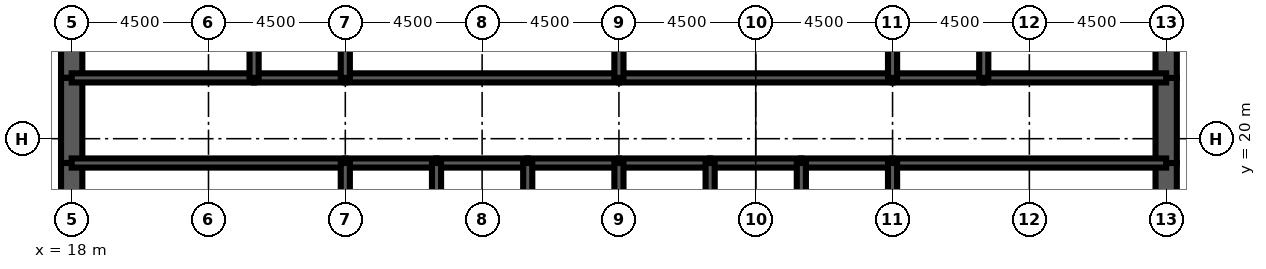
"""IFC4 building model, lengths in metres.
Left out: names, types, materials, properties, quantities, classifications, styles, units other than length and angle.
Written with IfcOpenShell. Run it as: python <this file> out.ifc"""

import sys

from ifc_helpers import new_model, si_unit, direction, frame, frame_2d, origin, place, context, subcontext, project, spatial, rectangle, extrude, element, fill, save


model = new_model("IFC4")
c1 = context("Model", 3, precision=1e-05, world=origin(), true_north=direction((0.0, 1.0)))
c2 = subcontext(c1, "Body", "Model", "MODEL_VIEW")
j1 = project(units=[si_unit("LENGTHUNIT", "METRE"), si_unit("PLANEANGLEUNIT", "RADIAN")], contexts=[c1])
p1 = place(None, origin())
s1 = spatial("IfcSite", under=j1, at=p1, CompositionType="ELEMENT")
p2 = place(p1, origin())
s2 = spatial("IfcBuilding", under=s1, at=p2, CompositionType="ELEMENT")
p3 = place(p2, frame((0.0, 0.0, 296.3)))
s3 = spatial("IfcBuildingStorey", under=s2, at=p3, CompositionType="ELEMENT", Elevation=296.3)
p4 = place(p3, frame((18.0, 26.0, 0.0), z_axis=(0.0, 0.0, 1.0), x_axis=(0.0, -1.0, 0.0)))
e1 = element("IfcWall", 1, at=p4, inside=s3, PredefinedType="SHEAR", context=c2, shape_type="SweptSolid", body=[
    extrude(rectangle(XDim=4.0, YDim=0.7, at=frame_2d((2.0, 0.0))), origin(), (0.0, 0.0, 1.0), 4.2),
])
p5 = place(p3, frame((18.0, 22.0, 0.0), z_axis=(0.0, 0.0, 1.0), x_axis=(0.0, -1.0, 0.0)))
e2 = element("IfcWall", 2, at=p5, inside=s3, PredefinedType="SHEAR", context=c2, shape_type="SweptSolid", body=[
    extrude(rectangle(XDim=2.8, YDim=0.7, at=frame_2d((1.4, 0.0))), origin(), (0.0, 0.0, 1.0), 4.2),
])
p6 = place(p5, frame((0.6, 0.0, 0.0)))
e3 = element("IfcOpeningElement", 3, at=p6, cuts=e2, PredefinedType="OPENING", context=c2, shape_type="SweptSolid", body=[
    extrude(rectangle(XDim=1.8, YDim=2.1, at=frame_2d((0.9, 1.05))), frame((0.0, 0.36, 0.0), z_axis=(0.0, -1.0, 0.0), x_axis=(1.0, 0.0, 0.0)), (0.0, 0.0, 1.0), 0.72),
])
for number, where, z_axis, x_axis in (
    (4, (18.0, 19.2, 0.0), (0.0, 0.0, 1.0), (0.0, -1.0, 0.0)),
    (5, (54.0, 16.0, 0.0), (0.0, 0.0, 1.0), (0.0, 1.0, 0.0)),
):
    element("IfcWall", number, at=place(p3, frame(where, z_axis=z_axis, x_axis=x_axis)), inside=s3, PredefinedType="SHEAR", context=c2, shape_type="SweptSolid", body=[
        extrude(rectangle(XDim=3.2, YDim=0.7, at=frame_2d((1.6, 0.0))), origin(), (0.0, 0.0, 1.0), 4.2),
    ])
p7 = place(p3, frame((54.0, 19.2, 0.0), z_axis=(0.0, 0.0, 1.0), x_axis=(0.0, 1.0, 0.0)))
e6 = element("IfcWall", 6, at=p7, inside=s3, PredefinedType="SHEAR", context=c2, shape_type="SweptSolid", body=[
    extrude(rectangle(XDim=2.8, YDim=0.7, at=frame_2d((1.4, 0.0))), origin(), (0.0, 0.0, 1.0), 4.2),
])
p8 = place(p7, frame((0.4, 0.0, 0.0)))
e7 = element("IfcOpeningElement", 7, at=p8, cuts=e6, PredefinedType="OPENING", context=c2, shape_type="SweptSolid", body=[
    extrude(rectangle(XDim=1.8, YDim=2.1, at=frame_2d((0.9, 1.05))), frame((0.0, 0.36, 0.0), z_axis=(0.0, -1.0, 0.0), x_axis=(1.0, 0.0, 0.0)), (0.0, 0.0, 1.0), 0.72),
])
p9 = place(p3, frame((54.0, 22.0, 0.0), z_axis=(0.0, 0.0, 1.0), x_axis=(0.0, 1.0, 0.0)))
e8 = element("IfcWall", 8, at=p9, inside=s3, PredefinedType="SHEAR", context=c2, shape_type="SweptSolid", body=[
    extrude(rectangle(XDim=4.0, YDim=0.7, at=frame_2d((2.0, 0.0))), origin(), (0.0, 0.0, 1.0), 4.2),
])
p10 = place(p3, frame((18.0, 19.2, 0.0), z_axis=(0.0, 0.0, 1.0), x_axis=(1.0, 0.0, 0.0)))
e9 = element("IfcWall", 9, at=p10, inside=s3, PredefinedType="SOLIDWALL", context=c2, shape_type="SweptSolid", body=[
    extrude(rectangle(XDim=9.0, YDim=0.3, at=frame_2d((4.5, 0.0))), origin(), (0.0, 0.0, 1.0), 4.2),
])
p11 = place(p10, frame((0.65, 0.0, 0.0)))
e10 = element("IfcOpeningElement", 10, at=p11, cuts=e9, PredefinedType="OPENING", context=c2, shape_type="SweptSolid", body=[
    extrude(rectangle(XDim=1.0, YDim=2.1, at=frame_2d((0.5, 1.05))), frame((0.0, 0.16, 0.0), z_axis=(0.0, -1.0, 0.0), x_axis=(1.0, 0.0, 0.0)), (0.0, 0.0, 1.0), 0.32),
])
p12 = place(p3, frame((27.0, 19.2, 0.0), z_axis=(0.0, 0.0, 1.0), x_axis=(1.0, 0.0, 0.0)))
e11 = element("IfcWall", 11, at=p12, inside=s3, PredefinedType="SOLIDWALL", context=c2, shape_type="SweptSolid", body=[
    extrude(rectangle(XDim=3.0, YDim=0.3, at=frame_2d((1.5, 0.0))), origin(), (0.0, 0.0, 1.0), 4.2),
])
p13 = place(p12, frame((0.95, 0.0, 0.0)))
e12 = element("IfcOpeningElement", 12, at=p13, cuts=e11, PredefinedType="OPENING", context=c2, shape_type="SweptSolid", body=[
    extrude(rectangle(XDim=1.1, YDim=2.2, at=frame_2d((0.55, 1.1))), frame((0.0, 0.16, 0.0), z_axis=(0.0, -1.0, 0.0), x_axis=(1.0, 0.0, 0.0)), (0.0, 0.0, 1.0), 0.32),
])
p14 = place(p3, frame((30.0, 19.2, 0.0), z_axis=(0.0, 0.0, 1.0), x_axis=(1.0, 0.0, 0.0)))
e13 = element("IfcWall", 13, at=p14, inside=s3, PredefinedType="SOLIDWALL", context=c2, shape_type="SweptSolid", body=[
    extrude(rectangle(XDim=3.0, YDim=0.3, at=frame_2d((1.5, 0.0))), origin(), (0.0, 0.0, 1.0), 4.2),
])
p15 = place(p14, frame((0.95, 0.0, 0.0)))
e14 = element("IfcOpeningElement", 14, at=p15, cuts=e13, PredefinedType="OPENING", context=c2, shape_type="SweptSolid", body=[
    extrude(rectangle(XDim=1.1, YDim=2.2, at=frame_2d((0.55, 1.1))), frame((0.0, 0.16, 0.0), z_axis=(0.0, -1.0, 0.0), x_axis=(1.0, 0.0, 0.0)), (0.0, 0.0, 1.0), 0.32),
])
p16 = place(p3, frame((33.0, 19.2, 0.0), z_axis=(0.0, 0.0, 1.0), x_axis=(1.0, 0.0, 0.0)))
e15 = element("IfcWall", 15, at=p16, inside=s3, PredefinedType="SOLIDWALL", context=c2, shape_type="SweptSolid", body=[
    extrude(rectangle(XDim=3.0, YDim=0.3, at=frame_2d((1.5, 0.0))), origin(), (0.0, 0.0, 1.0), 4.2),
])
p17 = place(p16, frame((0.95, 0.0, 0.0)))
e16 = element("IfcOpeningElement", 16, at=p17, cuts=e15, PredefinedType="OPENING", context=c2, shape_type="SweptSolid", body=[
    extrude(rectangle(XDim=1.1, YDim=2.2, at=frame_2d((0.55, 1.1))), frame((0.0, 0.16, 0.0), z_axis=(0.0, -1.0, 0.0), x_axis=(1.0, 0.0, 0.0)), (0.0, 0.0, 1.0), 0.32),
])
p18 = place(p3, frame((36.0, 19.2, 0.0), z_axis=(0.0, 0.0, 1.0), x_axis=(1.0, 0.0, 0.0)))
e17 = element("IfcWall", 17, at=p18, inside=s3, PredefinedType="SOLIDWALL", context=c2, shape_type="SweptSolid", body=[
    extrude(rectangle(XDim=3.0, YDim=0.3, at=frame_2d((1.5, 0.0))), origin(), (0.0, 0.0, 1.0), 4.2),
])
p19 = place(p18, frame((0.95, 0.0, 0.0)))
e18 = element("IfcOpeningElement", 18, at=p19, cuts=e17, PredefinedType="OPENING", context=c2, shape_type="SweptSolid", body=[
    extrude(rectangle(XDim=1.1, YDim=2.2, at=frame_2d((0.55, 1.1))), frame((0.0, 0.16, 0.0), z_axis=(0.0, -1.0, 0.0), x_axis=(1.0, 0.0, 0.0)), (0.0, 0.0, 1.0), 0.32),
])
p20 = place(p3, frame((39.0, 19.2, 0.0), z_axis=(0.0, 0.0, 1.0), x_axis=(1.0, 0.0, 0.0)))
e19 = element("IfcWall", 19, at=p20, inside=s3, PredefinedType="SOLIDWALL", context=c2, shape_type="SweptSolid", body=[
    extrude(rectangle(XDim=3.0, YDim=0.3, at=frame_2d((1.5, 0.0))), origin(), (0.0, 0.0, 1.0), 4.2),
])
p21 = place(p20, frame((1.0, 0.0, 0.0)))
e20 = element("IfcOpeningElement", 20, at=p21, cuts=e19, PredefinedType="OPENING", context=c2, shape_type="SweptSolid", body=[
    extrude(rectangle(XDim=1.0, YDim=2.1, at=frame_2d((0.5, 1.05))), frame((0.0, 0.16, 0.0), z_axis=(0.0, -1.0, 0.0), x_axis=(1.0, 0.0, 0.0)), (0.0, 0.0, 1.0), 0.32),
])
p22 = place(p3, frame((42.0, 19.2, 0.0), z_axis=(0.0, 0.0, 1.0), x_axis=(1.0, 0.0, 0.0)))
e21 = element("IfcWall", 21, at=p22, inside=s3, PredefinedType="SOLIDWALL", context=c2, shape_type="SweptSolid", body=[
    extrude(rectangle(XDim=3.0, YDim=0.3, at=frame_2d((1.5, 0.0))), origin(), (0.0, 0.0, 1.0), 4.2),
])
p23 = place(p22, frame((1.0, 0.0, 0.0)))
e22 = element("IfcOpeningElement", 22, at=p23, cuts=e21, PredefinedType="OPENING", context=c2, shape_type="SweptSolid", body=[
    extrude(rectangle(XDim=1.0, YDim=2.1, at=frame_2d((0.5, 1.05))), frame((0.0, 0.16, 0.0), z_axis=(0.0, -1.0, 0.0), x_axis=(1.0, 0.0, 0.0)), (0.0, 0.0, 1.0), 0.32),
])
p24 = place(p3, frame((45.0, 19.2, 0.0), z_axis=(0.0, 0.0, 1.0), x_axis=(1.0, 0.0, 0.0)))
e23 = element("IfcWall", 23, at=p24, inside=s3, PredefinedType="SOLIDWALL", context=c2, shape_type="SweptSolid", body=[
    extrude(rectangle(XDim=9.0, YDim=0.3, at=frame_2d((4.5, 0.0))), origin(), (0.0, 0.0, 1.0), 4.2),
])
p25 = place(p24, frame((7.35, 0.0, 0.0)))
e24 = element("IfcOpeningElement", 24, at=p25, cuts=e23, PredefinedType="OPENING", context=c2, shape_type="SweptSolid", body=[
    extrude(rectangle(XDim=1.0, YDim=2.1, at=frame_2d((0.5, 1.05))), frame((0.0, 0.16, 0.0), z_axis=(0.0, -1.0, 0.0), x_axis=(1.0, 0.0, 0.0)), (0.0, 0.0, 1.0), 0.32),
])
p26 = place(p3, frame((18.0, 22.0, 0.0), z_axis=(0.0, 0.0, 1.0), x_axis=(1.0, 0.0, 0.0)))
e25 = element("IfcWall", 25, at=p26, inside=s3, PredefinedType="SOLIDWALL", context=c2, shape_type="SweptSolid", body=[
    extrude(rectangle(XDim=6.0, YDim=0.3, at=frame_2d((3.0, 0.0))), origin(), (0.0, 0.0, 1.0), 4.2),
])
p27 = place(p26, frame((4.4, 0.0, 0.0)))
e26 = element("IfcOpeningElement", 26, at=p27, cuts=e25, PredefinedType="OPENING", context=c2, shape_type="SweptSolid", body=[
    extrude(rectangle(XDim=1.0, YDim=2.1, at=frame_2d((0.5, 1.05))), frame((0.0, 0.16, 0.0), z_axis=(0.0, -1.0, 0.0), x_axis=(1.0, 0.0, 0.0)), (0.0, 0.0, 1.0), 0.32),
])
p28 = place(p26, frame((0.6, 0.0, 0.0)))
e27 = element("IfcOpeningElement", 27, at=p28, cuts=e25, PredefinedType="OPENING", context=c2, shape_type="SweptSolid", body=[
    extrude(rectangle(XDim=1.0, YDim=2.1, at=frame_2d((0.5, 1.05))), frame((0.0, 0.16, 0.0), z_axis=(0.0, -1.0, 0.0), x_axis=(1.0, 0.0, 0.0)), (0.0, 0.0, 1.0), 0.32),
])
p29 = place(p3, frame((24.0, 22.0, 0.0), z_axis=(0.0, 0.0, 1.0), x_axis=(1.0, 0.0, 0.0)))
e28 = element("IfcWall", 28, at=p29, inside=s3, PredefinedType="SOLIDWALL", context=c2, shape_type="SweptSolid", body=[
    extrude(rectangle(XDim=3.0, YDim=0.3, at=frame_2d((1.5, 0.0))), origin(), (0.0, 0.0, 1.0), 4.2),
])
p30 = place(p29, frame((1.0, 0.0, 0.0)))
e29 = element("IfcOpeningElement", 29, at=p30, cuts=e28, PredefinedType="OPENING", context=c2, shape_type="SweptSolid", body=[
    extrude(rectangle(XDim=1.0, YDim=2.1, at=frame_2d((0.5, 1.05))), frame((0.0, 0.16, 0.0), z_axis=(0.0, -1.0, 0.0), x_axis=(1.0, 0.0, 0.0)), (0.0, 0.0, 1.0), 0.32),
])
p31 = place(p3, frame((27.0, 22.0, 0.0), z_axis=(0.0, 0.0, 1.0), x_axis=(1.0, 0.0, 0.0)))
e30 = element("IfcWall", 30, at=p31, inside=s3, PredefinedType="SOLIDWALL", context=c2, shape_type="SweptSolid", body=[
    extrude(rectangle(XDim=9.0, YDim=0.3, at=frame_2d((4.5, 0.0))), origin(), (0.0, 0.0, 1.0), 4.2),
])
p32 = place(p31, frame((4.0, 0.0, 0.0)))
e31 = element("IfcOpeningElement", 31, at=p32, cuts=e30, PredefinedType="OPENING", context=c2, shape_type="SweptSolid", body=[
    extrude(rectangle(XDim=1.0, YDim=2.1, at=frame_2d((0.5, 1.05))), frame((0.0, 0.16, 0.0), z_axis=(0.0, -1.0, 0.0), x_axis=(1.0, 0.0, 0.0)), (0.0, 0.0, 1.0), 0.32),
])
p33 = place(p3, frame((36.0, 22.0, 0.0), z_axis=(0.0, 0.0, 1.0), x_axis=(1.0, 0.0, 0.0)))
e32 = element("IfcWall", 32, at=p33, inside=s3, PredefinedType="SOLIDWALL", context=c2, shape_type="SweptSolid", body=[
    extrude(rectangle(XDim=9.0, YDim=0.3, at=frame_2d((4.5, 0.0))), origin(), (0.0, 0.0, 1.0), 4.2),
])
p34 = place(p33, frame((4.0, 0.0, 0.0)))
e33 = element("IfcOpeningElement", 33, at=p34, cuts=e32, PredefinedType="OPENING", context=c2, shape_type="SweptSolid", body=[
    extrude(rectangle(XDim=1.0, YDim=2.1, at=frame_2d((0.5, 1.05))), frame((0.0, 0.16, 0.0), z_axis=(0.0, -1.0, 0.0), x_axis=(1.0, 0.0, 0.0)), (0.0, 0.0, 1.0), 0.32),
])
p35 = place(p3, frame((45.0, 22.0, 0.0), z_axis=(0.0, 0.0, 1.0), x_axis=(1.0, 0.0, 0.0)))
e34 = element("IfcWall", 34, at=p35, inside=s3, PredefinedType="SOLIDWALL", context=c2, shape_type="SweptSolid", body=[
    extrude(rectangle(XDim=3.0, YDim=0.3, at=frame_2d((1.5, 0.0))), origin(), (0.0, 0.0, 1.0), 4.2),
])
p36 = place(p35, frame((1.0, 0.0, 0.0)))
e35 = element("IfcOpeningElement", 35, at=p36, cuts=e34, PredefinedType="OPENING", context=c2, shape_type="SweptSolid", body=[
    extrude(rectangle(XDim=1.0, YDim=2.1, at=frame_2d((0.5, 1.05))), frame((0.0, 0.16, 0.0), z_axis=(0.0, -1.0, 0.0), x_axis=(1.0, 0.0, 0.0)), (0.0, 0.0, 1.0), 0.32),
])
p37 = place(p3, frame((48.0, 22.0, 0.0), z_axis=(0.0, 0.0, 1.0), x_axis=(1.0, 0.0, 0.0)))
e36 = element("IfcWall", 36, at=p37, inside=s3, PredefinedType="SOLIDWALL", context=c2, shape_type="SweptSolid", body=[
    extrude(rectangle(XDim=6.0, YDim=0.3, at=frame_2d((3.0, 0.0))), origin(), (0.0, 0.0, 1.0), 4.2),
])
p38 = place(p37, frame((2.0, 0.0, 0.0)))
e37 = element("IfcOpeningElement", 37, at=p38, cuts=e36, PredefinedType="OPENING", context=c2, shape_type="SweptSolid", body=[
    extrude(rectangle(XDim=1.0, YDim=2.1, at=frame_2d((0.5, 1.05))), frame((0.0, 0.16, 0.0), z_axis=(0.0, -1.0, 0.0), x_axis=(1.0, 0.0, 0.0)), (0.0, 0.0, 1.0), 0.32),
])
p39 = place(p37, frame((4.1, 0.0, 0.0)))
e38 = element("IfcOpeningElement", 38, at=p39, cuts=e36, PredefinedType="OPENING", context=c2, shape_type="SweptSolid", body=[
    extrude(rectangle(XDim=1.0, YDim=2.1, at=frame_2d((0.5, 1.05))), frame((0.0, 0.16, 0.0), z_axis=(0.0, -1.0, 0.0), x_axis=(1.0, 0.0, 0.0)), (0.0, 0.0, 1.0), 0.32),
])
for number, where, z_axis, x_axis in (
    (39, (27.0, 16.0, 0.0), (0.0, 0.0, 1.0), (0.0, 1.0, 0.0)),
    (40, (30.0, 16.0, 0.0), (0.0, 0.0, 1.0), (0.0, 1.0, 0.0)),
    (41, (33.0, 16.0, 0.0), (0.0, 0.0, 1.0), (0.0, 1.0, 0.0)),
    (42, (36.0, 16.0, 0.0), (0.0, 0.0, 1.0), (0.0, 1.0, 0.0)),
    (43, (39.0, 16.0, 0.0), (0.0, 0.0, 1.0), (0.0, 1.0, 0.0)),
    (44, (42.0, 16.0, 0.0), (0.0, 0.0, 1.0), (0.0, 1.0, 0.0)),
    (45, (45.0, 16.0, 0.0), (0.0, 0.0, 1.0), (0.0, 1.0, 0.0)),
):
    element("IfcWall", number, at=place(p3, frame(where, z_axis=z_axis, x_axis=x_axis)), inside=s3, PredefinedType="SOLIDWALL", context=c2, shape_type="SweptSolid", body=[
        extrude(rectangle(XDim=3.2, YDim=0.3, at=frame_2d((1.6, 0.0))), origin(), (0.0, 0.0, 1.0), 4.2),
    ])
for number, where, z_axis, x_axis in (
    (46, (24.0, 22.0, 0.0), (0.0, 0.0, 1.0), (0.0, 1.0, 0.0)),
    (47, (27.0, 22.0, 0.0), (0.0, 0.0, 1.0), (0.0, 1.0, 0.0)),
    (48, (36.0, 22.0, 0.0), (0.0, 0.0, 1.0), (0.0, 1.0, 0.0)),
    (49, (45.0, 22.0, 0.0), (0.0, 0.0, 1.0), (0.0, 1.0, 0.0)),
    (50, (48.0, 22.0, 0.0), (0.0, 0.0, 1.0), (0.0, 1.0, 0.0)),
):
    element("IfcWall", number, at=place(p3, frame(where, z_axis=z_axis, x_axis=x_axis)), inside=s3, PredefinedType="SOLIDWALL", context=c2, shape_type="SweptSolid", body=[
        extrude(rectangle(XDim=4.0, YDim=0.3, at=frame_2d((2.0, 0.0))), origin(), (0.0, 0.0, 1.0), 4.2),
    ])
p40 = place(p3, frame((38.5, 22.15, 0.0), z_axis=(0.0, 0.0, 1.0), x_axis=(0.0, 1.0, 0.0)))
e51 = element("IfcWall", 51, at=p40, inside=s3, PredefinedType="PARTITIONING", context=c2, shape_type="SweptSolid", body=[
    extrude(rectangle(XDim=3.7, YDim=0.15, at=frame_2d((1.85, 0.0))), origin(), (0.0, 0.0, 1.0), 3.0),
])
p41 = place(p40, frame((2.2, 0.0, 0.0)))
e52 = element("IfcOpeningElement", 52, at=p41, cuts=e51, PredefinedType="OPENING", context=c2, shape_type="SweptSolid", body=[
    extrude(rectangle(XDim=1.0, YDim=2.1, at=frame_2d((0.5, 1.05))), frame((0.0, 0.085, 0.0), z_axis=(0.0, -1.0, 0.0), x_axis=(1.0, 0.0, 0.0)), (0.0, 0.0, 1.0), 0.17),
])
for number, where, z_axis, x_axis in (
    (53, (19.925, 22.15, 0.0), (0.0, 0.0, 1.0), (0.0, 1.0, 0.0)),
    (54, (51.475, 22.15, 0.0), (0.0, 0.0, 1.0), (0.0, 1.0, 0.0)),
):
    element("IfcWall", number, at=place(p3, frame(where, z_axis=z_axis, x_axis=x_axis)), inside=s3, PredefinedType="PARTITIONING", context=c2, shape_type="SweptSolid", body=[
        extrude(rectangle(XDim=3.7, YDim=0.15, at=frame_2d((1.85, 0.0))), origin(), (0.0, 0.0, 1.0), 3.0),
    ])
p42 = place(p13, origin())
e55 = element("IfcDoor", 55, at=p42, inside=s3, OperationType="DOUBLE_DOOR_SLIDING", PredefinedType="USERDEFINED", context=c2, shape_type="SweptSolid", body=[
    extrude(rectangle(XDim=1.1, YDim=2.2, at=frame_2d((0.55, 1.1))), frame((0.0, 0.025, 0.0), z_axis=(0.0, -1.0, 0.0), x_axis=(1.0, 0.0, 0.0)), (0.0, 0.0, 1.0), 0.05),
])
fill(e12, e55)
p43 = place(p15, origin())
e56 = element("IfcDoor", 56, at=p43, inside=s3, OperationType="DOUBLE_DOOR_SLIDING", PredefinedType="USERDEFINED", context=c2, shape_type="SweptSolid", body=[
    extrude(rectangle(XDim=1.1, YDim=2.2, at=frame_2d((0.55, 1.1))), frame((0.0, 0.025, 0.0), z_axis=(0.0, -1.0, 0.0), x_axis=(1.0, 0.0, 0.0)), (0.0, 0.0, 1.0), 0.05),
])
fill(e14, e56)
p44 = place(p17, origin())
e57 = element("IfcDoor", 57, at=p44, inside=s3, OperationType="DOUBLE_DOOR_SLIDING", PredefinedType="USERDEFINED", context=c2, shape_type="SweptSolid", body=[
    extrude(rectangle(XDim=1.1, YDim=2.2, at=frame_2d((0.55, 1.1))), frame((0.0, 0.025, 0.0), z_axis=(0.0, -1.0, 0.0), x_axis=(1.0, 0.0, 0.0)), (0.0, 0.0, 1.0), 0.05),
])
fill(e16, e57)
p45 = place(p19, origin())
e58 = element("IfcDoor", 58, at=p45, inside=s3, OperationType="DOUBLE_DOOR_SLIDING", PredefinedType="USERDEFINED", context=c2, shape_type="SweptSolid", body=[
    extrude(rectangle(XDim=1.1, YDim=2.2, at=frame_2d((0.55, 1.1))), frame((0.0, 0.025, 0.0), z_axis=(0.0, -1.0, 0.0), x_axis=(1.0, 0.0, 0.0)), (0.0, 0.0, 1.0), 0.05),
])
fill(e18, e58)
p46 = place(p11, origin())
e59 = element("IfcDoor", 59, at=p46, inside=s3, OperationType="SINGLE_SWING_LEFT", PredefinedType="DOOR", context=c2, shape_type="SweptSolid", body=[
    extrude(rectangle(XDim=1.0, YDim=2.1, at=frame_2d((0.5, 1.05))), frame((0.0, 0.025, 0.0), z_axis=(0.0, -1.0, 0.0), x_axis=(1.0, 0.0, 0.0)), (0.0, 0.0, 1.0), 0.05),
])
fill(e10, e59)
p47 = place(p25, origin())
e60 = element("IfcDoor", 60, at=p47, inside=s3, OperationType="SINGLE_SWING_RIGHT", PredefinedType="DOOR", context=c2, shape_type="SweptSolid", body=[
    extrude(rectangle(XDim=1.0, YDim=2.1, at=frame_2d((0.5, 1.05))), frame((0.0, 0.025, 0.0), z_axis=(0.0, -1.0, 0.0), x_axis=(1.0, 0.0, 0.0)), (0.0, 0.0, 1.0), 0.05),
])
fill(e24, e60)
p48 = place(p6, origin())
e61 = element("IfcDoor", 61, at=p48, inside=s3, OperationType="SINGLE_SWING_LEFT", PredefinedType="DOOR", context=c2, shape_type="SweptSolid", body=[
    extrude(rectangle(XDim=1.8, YDim=2.1, at=frame_2d((0.9, 1.05))), frame((0.0, 0.35, 0.0), z_axis=(0.0, -1.0, 0.0), x_axis=(1.0, 0.0, 0.0)), (0.0, 0.0, 1.0), 0.699),
])
fill(e3, e61)
p49 = place(p8, origin())
e62 = element("IfcDoor", 62, at=p49, inside=s3, OperationType="SINGLE_SWING_LEFT", PredefinedType="DOOR", context=c2, shape_type="SweptSolid", body=[
    extrude(rectangle(XDim=1.8, YDim=2.1, at=frame_2d((0.9, 1.05))), frame((0.0, 0.35, 0.0), z_axis=(0.0, -1.0, 0.0), x_axis=(1.0, 0.0, 0.0)), (0.0, 0.0, 1.0), 0.699),
])
fill(e7, e62)
p50 = place(p27, origin())
e63 = element("IfcDoor", 63, at=p50, inside=s3, OperationType="SINGLE_SWING_RIGHT", PredefinedType="DOOR", context=c2, shape_type="SweptSolid", body=[
    extrude(rectangle(XDim=1.0, YDim=2.1, at=frame_2d((0.5, 1.05))), frame((0.0, 0.025, 0.0), z_axis=(0.0, -1.0, 0.0), x_axis=(1.0, 0.0, 0.0)), (0.0, 0.0, 1.0), 0.05),
])
fill(e26, e63)
p51 = place(p30, origin())
e64 = element("IfcDoor", 64, at=p51, inside=s3, OperationType="SINGLE_SWING_LEFT", PredefinedType="DOOR", context=c2, shape_type="SweptSolid", body=[
    extrude(rectangle(XDim=1.0, YDim=2.1, at=frame_2d((0.5, 1.05))), frame((0.0, 0.025, 0.0), z_axis=(0.0, -1.0, 0.0), x_axis=(1.0, 0.0, 0.0)), (0.0, 0.0, 1.0), 0.05),
])
fill(e29, e64)
p52 = place(p32, origin())
e65 = element("IfcDoor", 65, at=p52, inside=s3, OperationType="SINGLE_SWING_LEFT", PredefinedType="DOOR", context=c2, shape_type="SweptSolid", body=[
    extrude(rectangle(XDim=1.0, YDim=2.1, at=frame_2d((0.5, 1.05))), frame((0.0, 0.025, 0.0), z_axis=(0.0, -1.0, 0.0), x_axis=(1.0, 0.0, 0.0)), (0.0, 0.0, 1.0), 0.05),
])
fill(e31, e65)
p53 = place(p34, origin())
e66 = element("IfcDoor", 66, at=p53, inside=s3, OperationType="SINGLE_SWING_LEFT", PredefinedType="DOOR", context=c2, shape_type="SweptSolid", body=[
    extrude(rectangle(XDim=1.0, YDim=2.1, at=frame_2d((0.5, 1.05))), frame((0.0, 0.025, 0.0), z_axis=(0.0, -1.0, 0.0), x_axis=(1.0, 0.0, 0.0)), (0.0, 0.0, 1.0), 0.05),
])
fill(e33, e66)
p54 = place(p36, origin())
e67 = element("IfcDoor", 67, at=p54, inside=s3, OperationType="SINGLE_SWING_LEFT", PredefinedType="DOOR", context=c2, shape_type="SweptSolid", body=[
    extrude(rectangle(XDim=1.0, YDim=2.1, at=frame_2d((0.5, 1.05))), frame((0.0, 0.025, 0.0), z_axis=(0.0, -1.0, 0.0), x_axis=(1.0, 0.0, 0.0)), (0.0, 0.0, 1.0), 0.05),
])
fill(e35, e67)
p55 = place(p38, origin())
e68 = element("IfcDoor", 68, at=p55, inside=s3, OperationType="SINGLE_SWING_LEFT", PredefinedType="DOOR", context=c2, shape_type="SweptSolid", body=[
    extrude(rectangle(XDim=1.0, YDim=2.1, at=frame_2d((0.5, 1.05))), frame((0.0, 0.025, 0.0), z_axis=(0.0, -1.0, 0.0), x_axis=(1.0, 0.0, 0.0)), (0.0, 0.0, 1.0), 0.05),
])
fill(e37, e68)
p56 = place(p28, origin())
e69 = element("IfcDoor", 69, at=p56, inside=s3, OperationType="SINGLE_SWING_LEFT", PredefinedType="DOOR", context=c2, shape_type="SweptSolid", body=[
    extrude(rectangle(XDim=1.0, YDim=2.1, at=frame_2d((0.5, 1.05))), frame((0.0, 0.025, 0.0), z_axis=(0.0, -1.0, 0.0), x_axis=(1.0, 0.0, 0.0)), (0.0, 0.0, 1.0), 0.05),
])
fill(e27, e69)
p57 = place(p39, origin())
e70 = element("IfcDoor", 70, at=p57, inside=s3, OperationType="SINGLE_SWING_RIGHT", PredefinedType="DOOR", context=c2, shape_type="SweptSolid", body=[
    extrude(rectangle(XDim=1.0, YDim=2.1, at=frame_2d((0.5, 1.05))), frame((0.0, 0.025, 0.0), z_axis=(0.0, -1.0, 0.0), x_axis=(1.0, 0.0, 0.0)), (0.0, 0.0, 1.0), 0.05),
])
fill(e38, e70)
p58 = place(p21, origin())
e71 = element("IfcDoor", 71, at=p58, inside=s3, OperationType="SINGLE_SWING_LEFT", PredefinedType="DOOR", context=c2, shape_type="SweptSolid", body=[
    extrude(rectangle(XDim=1.0, YDim=2.1, at=frame_2d((0.5, 1.05))), frame((0.0, 0.025, 0.0), z_axis=(0.0, -1.0, 0.0), x_axis=(1.0, 0.0, 0.0)), (0.0, 0.0, 1.0), 0.05),
])
fill(e20, e71)
p59 = place(p23, origin())
e72 = element("IfcDoor", 72, at=p59, inside=s3, OperationType="SINGLE_SWING_LEFT", PredefinedType="DOOR", context=c2, shape_type="SweptSolid", body=[
    extrude(rectangle(XDim=1.0, YDim=2.1, at=frame_2d((0.5, 1.05))), frame((0.0, 0.025, 0.0), z_axis=(0.0, -1.0, 0.0), x_axis=(1.0, 0.0, 0.0)), (0.0, 0.0, 1.0), 0.05),
])
fill(e22, e72)
save(model, sys.argv[1])
